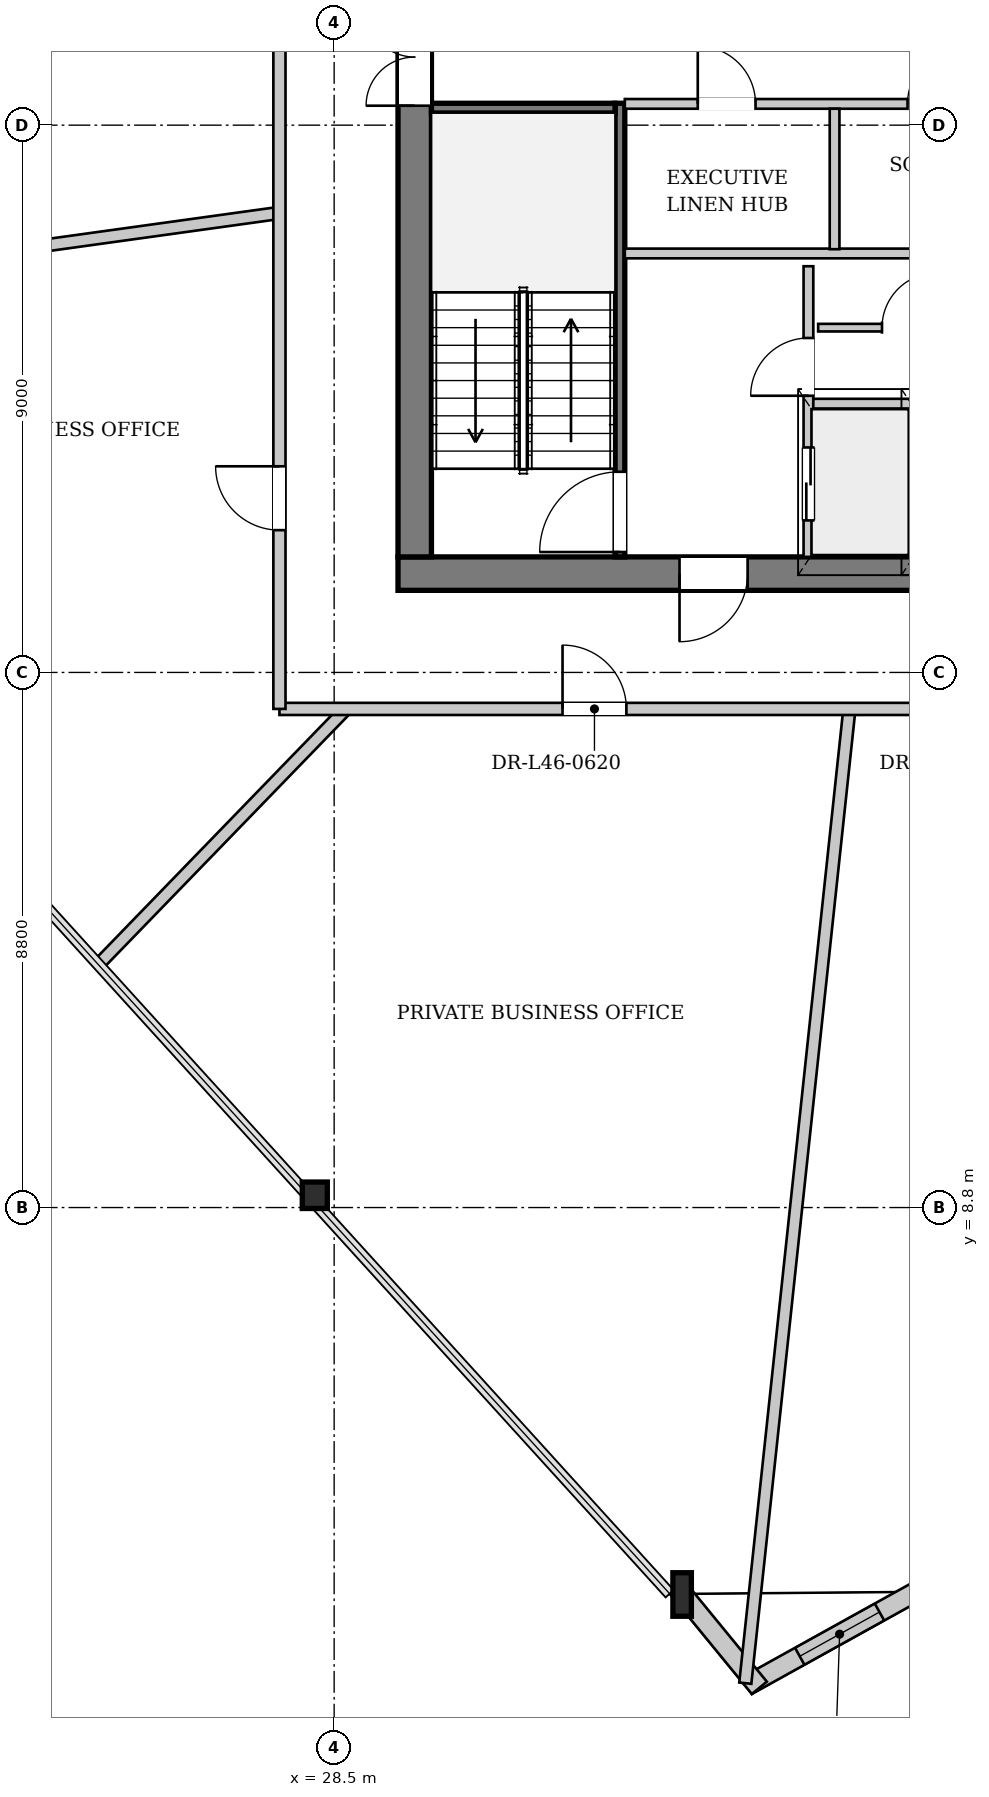
"""IFC4 building model, lengths in metres.
Left out: names, types, materials, properties, quantities, classifications, styles, units other than length and angle.
Written with IfcOpenShell. Run it as: python <this file> out.ifc"""

import sys

from ifc_helpers import new_model, si_unit, direction, frame, frame_2d, origin, origin_2d, place, context, subcontext, project, spatial, rectangle, i_section, extrude, source, transform, mapped, element, fill, save


model = new_model("IFC4")
c1 = context("Model", 3, precision=1e-05, world=origin(), true_north=direction((0.0, 1.0)))
c2 = subcontext(c1, "Body", "Model", "MODEL_VIEW")
j1 = project(units=[si_unit("LENGTHUNIT", "METRE"), si_unit("PLANEANGLEUNIT", "RADIAN")], contexts=[c1])
p1 = place(None, origin())
s1 = spatial("IfcSite", under=j1, at=p1, CompositionType="ELEMENT")
p2 = place(p1, origin())
s2 = spatial("IfcBuilding", under=s1, at=p2, CompositionType="ELEMENT")
p3 = place(p2, frame((0.0, 0.0, 175.0)))
s3 = spatial("IfcBuildingStorey", under=s2, at=p3, CompositionType="ELEMENT", Elevation=175.0)
m1 = source(origin(), c2, "Body", "SweptSolid", [
    extrude(i_section(OverallWidth=0.412, OverallDepth=0.435, WebThickness=0.031, FlangeThickness=0.05, at=origin_2d()), origin(), (0.0, 0.0, 1.0), 3.403),
])
p4 = place(p3, frame((28.016, 9.058, 0.0), z_axis=(0.097141816378, -0.032643667985, 0.994735069479), x_axis=(0.318537097398, 0.947910395334, 0.0)))
e1 = element("IfcColumn", 1, at=p4, inside=s3, PredefinedType="COLUMN", context=c2, shape_type="MappedRepresentation", body=[
    mapped(m1, transform((0.0, 0.0, 0.0), x_axis=(1.0, 0.0, 0.0), y_axis=(0.0, 1.0, 0.0), z_axis=(0.0, 0.0, 1.0), scale=1.0)),
])
m2 = source(origin(), c2, "Body", "SweptSolid", [
    extrude(i_section(OverallWidth=0.304, OverallDepth=0.716, WebThickness=0.021, FlangeThickness=0.04, at=origin_2d()), origin(), (0.0, 0.0, 1.0), 3.41),
])
p5 = place(p3, frame((34.018, 2.449, 0.0), z_axis=(0.120214638994, -0.007517889872, 0.992719457804), x_axis=(0.062415293513, 0.998050264834, 0.0)))
e2 = element("IfcColumn", 2, at=p5, inside=s3, PredefinedType="COLUMN", context=c2, shape_type="MappedRepresentation", body=[
    mapped(m2, transform((0.0, 0.0, 0.0), x_axis=(1.0, 0.0, 0.0), y_axis=(0.0, 1.0, 0.0), z_axis=(0.0, 0.0, 1.0), scale=1.0)),
])
p6 = place(p3, frame((38.333, 2.628, 0.0), z_axis=(0.0, 0.0, 1.0), x_axis=(-0.874431894113, -0.485148289246, 0.0)))
e3 = element("IfcWall", 3, at=p6, inside=s3, PredefinedType="SOLIDWALL", context=c2, shape_type="SweptSolid", body=[
    extrude(rectangle(XDim=3.479, YDim=0.32, at=frame_2d((1.739, 0.0))), origin(), (0.0, 0.0, 1.0), 2.722),
])
p7 = place(p6, frame((0.989, 0.0, 0.302)))
e4 = element("IfcOpeningElement", 4, at=p7, cuts=e3, PredefinedType="OPENING", context=c2, shape_type="SweptSolid", body=[
    extrude(rectangle(XDim=1.5, YDim=2.3, at=frame_2d((0.75, 1.15))), frame((0.0, 0.17, 0.0), z_axis=(0.0, -1.0, 0.0), x_axis=(1.0, 0.0, 0.0)), (0.0, 0.0, 1.0), 0.34),
])
p8 = place(p3, frame((35.493, 0.901, 0.0), z_axis=(0.0, 0.0, 1.0), x_axis=(-0.633742690668, 0.773543923785, 0.0)))
e5 = element("IfcWall", 5, at=p8, inside=s3, PredefinedType="SOLIDWALL", context=c2, shape_type="SweptSolid", body=[
    extrude(rectangle(XDim=2.132, YDim=0.32, at=frame_2d((1.066, 0.0))), origin(), (0.0, 0.0, 1.0), 2.722),
])
p9 = place(p3, frame((46.45, 19.225, 0.0), z_axis=(0.0, 0.0, 1.0), x_axis=(-1.0, 0.0, 0.0)))
e6 = element("IfcWall", 6, at=p9, inside=s3, PredefinedType="SHEAR", context=c2, shape_type="SweptSolid", body=[
    extrude(rectangle(XDim=16.9, YDim=0.55, at=frame_2d((8.45, 0.0))), origin(), (0.0, 0.0, 1.0), 3.33),
])
p10 = place(p9, frame((4.65, 0.0, 0.0)))
e7 = element("IfcOpeningElement", 7, at=p10, cuts=e6, PredefinedType="OPENING", context=c2, shape_type="SweptSolid", body=[
    extrude(rectangle(XDim=1.12, YDim=2.25, at=frame_2d((0.56, 1.125))), frame((0.0, 0.285, 0.0), z_axis=(0.0, -1.0, 0.0), x_axis=(1.0, 0.0, 0.0)), (0.0, 0.0, 1.0), 0.57),
])
p11 = place(p9, frame((11.15, 0.0, 0.0)))
e8 = element("IfcOpeningElement", 8, at=p11, cuts=e6, PredefinedType="OPENING", context=c2, shape_type="SweptSolid", body=[
    extrude(rectangle(XDim=1.12, YDim=2.25, at=frame_2d((0.56, 1.125))), frame((0.0, 0.285, 0.0), z_axis=(0.0, -1.0, 0.0), x_axis=(1.0, 0.0, 0.0)), (0.0, 0.0, 1.0), 0.57),
])
p12 = place(p3, frame((29.825, 19.5, 0.0), z_axis=(0.0, 0.0, 1.0), x_axis=(0.0, 1.0, 0.0)))
e9 = element("IfcWall", 9, at=p12, inside=s3, PredefinedType="SHEAR", context=c2, shape_type="SweptSolid", body=[
    extrude(rectangle(XDim=14.2, YDim=0.55, at=frame_2d((7.1, 0.0))), origin(), (0.0, 0.0, 1.0), 3.33),
])
p13 = place(p12, frame((7.42, 0.0, 0.0)))
e10 = element("IfcOpeningElement", 10, at=p13, cuts=e9, PredefinedType="OPENING", context=c2, shape_type="SweptSolid", body=[
    extrude(rectangle(XDim=1.6, YDim=2.2, at=frame_2d((0.8, 1.1))), frame((0.0, 0.285, 0.0), z_axis=(0.0, -1.0, 0.0), x_axis=(1.0, 0.0, 0.0)), (0.0, 0.0, 1.0), 0.57),
])
p14 = place(p3, frame((33.2, 19.5, 0.0), z_axis=(0.0, 0.0, 1.0), x_axis=(0.0, 1.0, 0.0)))
e11 = element("IfcWall", 11, at=p14, inside=s3, PredefinedType="PARTITIONING", context=c2, shape_type="SweptSolid", body=[
    extrude(rectangle(XDim=7.46, YDim=0.16, at=frame_2d((3.73, 0.0))), origin(), (0.0, 0.0, 1.0), 3.33),
])
p15 = place(p14, frame((0.08, 0.0, 0.0)))
e12 = element("IfcOpeningElement", 12, at=p15, cuts=e11, PredefinedType="OPENING", context=c2, shape_type="SweptSolid", body=[
    extrude(rectangle(XDim=1.32, YDim=2.2, at=frame_2d((0.66, 1.1))), frame((0.0, 0.09, 0.0), z_axis=(0.0, -1.0, 0.0), x_axis=(1.0, 0.0, 0.0)), (0.0, 0.0, 1.0), 0.18),
])
p16 = place(p3, frame((30.1, 26.88, 0.0), z_axis=(0.0, 0.0, 1.0), x_axis=(1.0, 0.0, 0.0)))
e13 = element("IfcWall", 13, at=p16, inside=s3, PredefinedType="PARTITIONING", context=c2, shape_type="SweptSolid", body=[
    extrude(rectangle(XDim=3.02, YDim=0.16, at=frame_2d((1.51, 0.0))), origin(), (0.0, 0.0, 1.0), 3.33),
])
p17 = place(p3, frame((36.3, 19.5, 0.0), z_axis=(0.0, 0.0, 1.0), x_axis=(0.0, 1.0, 0.0)))
e14 = element("IfcWall", 14, at=p17, inside=s3, PredefinedType="PARTITIONING", context=c2, shape_type="SweptSolid", body=[
    extrude(rectangle(XDim=4.78, YDim=0.16, at=frame_2d((2.39, 0.0))), origin(), (0.0, 0.0, 1.0), 3.33),
])
p18 = place(p17, frame((0.6, 0.0, 0.0)))
e15 = element("IfcOpeningElement", 15, at=p18, cuts=e14, PredefinedType="OPENING", context=c2, shape_type="SweptSolid", body=[
    extrude(rectangle(XDim=1.2, YDim=2.2, at=frame_2d((0.6, 1.1))), frame((0.0, 0.09, 0.0), z_axis=(0.0, -1.0, 0.0), x_axis=(1.0, 0.0, 0.0)), (0.0, 0.0, 1.0), 0.18),
])
p19 = place(p17, frame((2.65, 0.0, 0.0)))
e16 = element("IfcOpeningElement", 16, at=p19, cuts=e14, PredefinedType="OPENING", context=c2, shape_type="SweptSolid", body=[
    extrude(rectangle(XDim=0.95, YDim=2.1, at=frame_2d((0.475, 1.05))), frame((0.0, 0.09, 0.0), z_axis=(0.0, -1.0, 0.0), x_axis=(1.0, 0.0, 0.0)), (0.0, 0.0, 1.0), 0.18),
])
p20 = place(p3, frame((38.0, 19.5, 0.0), z_axis=(0.0, 0.0, 1.0), x_axis=(0.0, 1.0, 0.0)))
e17 = element("IfcWall", 17, at=p20, inside=s3, PredefinedType="PARTITIONING", context=c2, shape_type="SweptSolid", body=[
    extrude(rectangle(XDim=2.46, YDim=0.125, at=frame_2d((1.23, 0.0))), origin(), (0.0, 0.0, 1.0), 3.33),
])
p21 = place(p3, frame((36.38, 22.02, 0.0), z_axis=(0.0, 0.0, 1.0), x_axis=(1.0, 0.0, 0.0)))
e18 = element("IfcWall", 18, at=p21, inside=s3, PredefinedType="PARTITIONING", context=c2, shape_type="SweptSolid", body=[
    extrude(rectangle(XDim=3.24, YDim=0.16, at=frame_2d((1.62, 0.0))), origin(), (0.0, 0.0, 1.0), 3.33),
])
p22 = place(p3, frame((33.28, 24.49, 0.0), z_axis=(0.0, 0.0, 1.0), x_axis=(1.0, 0.0, 0.0)))
e19 = element("IfcWall", 19, at=p22, inside=s3, PredefinedType="PARTITIONING", context=c2, shape_type="SweptSolid", body=[
    extrude(rectangle(XDim=9.44, YDim=0.16, at=frame_2d((4.72, 0.0))), origin(), (0.0, 0.0, 1.0), 3.33),
])
p23 = place(p3, frame((36.46, 23.27, 0.0), z_axis=(0.0, 0.0, 1.0), x_axis=(1.0, 0.0, 0.0)))
e20 = element("IfcWall", 20, at=p23, inside=s3, PredefinedType="PARTITIONING", context=c2, shape_type="SweptSolid", body=[
    extrude(rectangle(XDim=3.08, YDim=0.125, at=frame_2d((1.54, 0.0))), origin(), (0.0, 0.0, 1.0), 3.33),
])
p24 = place(p23, frame((1.05, 0.0, 0.0)))
e21 = element("IfcOpeningElement", 21, at=p24, cuts=e20, PredefinedType="OPENING", context=c2, shape_type="SweptSolid", body=[
    extrude(rectangle(XDim=0.9, YDim=2.1, at=frame_2d((0.45, 1.05))), frame((0.0, 0.073, 0.0), z_axis=(0.0, -1.0, 0.0), x_axis=(1.0, 0.0, 0.0)), (0.0, 0.0, 1.0), 0.145),
])
p25 = place(p3, frame((33.28, 26.95, 0.0), z_axis=(0.0, 0.0, 1.0), x_axis=(1.0, 0.0, 0.0)))
e22 = element("IfcWall", 22, at=p25, inside=s3, PredefinedType="PARTITIONING", context=c2, shape_type="SweptSolid", body=[
    extrude(rectangle(XDim=9.44, YDim=0.16, at=frame_2d((4.72, 0.0))), origin(), (0.0, 0.0, 1.0), 3.33),
])
p26 = place(p25, frame((1.2, 0.0, 0.0)))
e23 = element("IfcOpeningElement", 23, at=p26, cuts=e22, PredefinedType="OPENING", context=c2, shape_type="SweptSolid", body=[
    extrude(rectangle(XDim=0.95, YDim=2.1, at=frame_2d((0.475, 1.05))), frame((0.0, 0.09, 0.0), z_axis=(0.0, -1.0, 0.0), x_axis=(1.0, 0.0, 0.0)), (0.0, 0.0, 1.0), 0.18),
])
p27 = place(p25, frame((4.65, 0.0, 0.0)))
e24 = element("IfcOpeningElement", 24, at=p27, cuts=e22, PredefinedType="OPENING", context=c2, shape_type="SweptSolid", body=[
    extrude(rectangle(XDim=0.95, YDim=2.1, at=frame_2d((0.475, 1.05))), frame((0.0, 0.09, 0.0), z_axis=(0.0, -1.0, 0.0), x_axis=(1.0, 0.0, 0.0)), (0.0, 0.0, 1.0), 0.18),
])
p28 = place(p25, frame((7.67, 0.0, 0.0)))
e25 = element("IfcOpeningElement", 25, at=p28, cuts=e22, PredefinedType="OPENING", context=c2, shape_type="SweptSolid", body=[
    extrude(rectangle(XDim=1.1, YDim=2.2, at=frame_2d((0.55, 1.1))), frame((0.0, 0.09, 0.0), z_axis=(0.0, -1.0, 0.0), x_axis=(1.0, 0.0, 0.0)), (0.0, 0.0, 1.0), 0.18),
])
p29 = place(p3, frame((36.73, 24.56, 0.0), z_axis=(0.0, 0.0, 1.0), x_axis=(0.0, 1.0, 0.0)))
e26 = element("IfcWall", 26, at=p29, inside=s3, PredefinedType="PARTITIONING", context=c2, shape_type="SweptSolid", body=[
    extrude(rectangle(XDim=2.31, YDim=0.16, at=frame_2d((1.155, 0.0))), origin(), (0.0, 0.0, 1.0), 3.33),
])
p30 = place(p3, frame((27.6, 25.157, 0.0), z_axis=(0.0, 0.0, 1.0), x_axis=(-0.990508964045, -0.137448143484, 0.0)))
e27 = element("IfcWall", 27, at=p30, inside=s3, PredefinedType="PARTITIONING", context=c2, shape_type="SweptSolid", body=[
    extrude(rectangle(XDim=9.242, YDim=0.2, at=frame_2d((4.621, 0.0))), origin(), (0.0, 0.0, 1.0), 3.33),
])
p31 = place(p3, frame((28.697, 17.0, 0.0), z_axis=(0.0, 0.0, 1.0), x_axis=(-0.695914109274, -0.718125025684, 0.0)))
e28 = element("IfcWall", 28, at=p31, inside=s3, PredefinedType="PARTITIONING", context=c2, shape_type="SweptSolid", body=[
    extrude(rectangle(XDim=5.826, YDim=0.2, at=frame_2d((2.913, 0.0))), origin(), (0.0, 0.0, 1.0), 3.33),
])
p32 = place(p3, frame((36.974, 17.0, 0.0), z_axis=(0.0, 0.0, 1.0), x_axis=(-0.106274717856, -0.994336806291, 0.0)))
e29 = element("IfcWall", 29, at=p32, inside=s3, PredefinedType="PARTITIONING", context=c2, shape_type="SweptSolid", body=[
    extrude(rectangle(XDim=16.113, YDim=0.2, at=frame_2d((8.057, 0.0))), origin(), (0.0, 0.0, 1.0), 3.33),
])
p33 = place(p3, frame((27.6, 17.0, 0.0), z_axis=(0.0, 0.0, 1.0), x_axis=(1.0, 0.0, 0.0)))
e30 = element("IfcWall", 30, at=p33, inside=s3, PredefinedType="PARTITIONING", context=c2, shape_type="SweptSolid", body=[
    extrude(rectangle(XDim=20.8, YDim=0.2, at=frame_2d((10.4, 0.0))), origin(), (0.0, 0.0, 1.0), 3.33),
])
p34 = place(p33, frame((4.656, 0.0, 0.0)))
e31 = element("IfcOpeningElement", 31, at=p34, cuts=e30, PredefinedType="OPENING", context=c2, shape_type="SweptSolid", body=[
    extrude(rectangle(XDim=1.05, YDim=2.2, at=frame_2d((0.525, 1.1))), frame((0.0, 0.11, 0.0), z_axis=(0.0, -1.0, 0.0), x_axis=(1.0, 0.0, 0.0)), (0.0, 0.0, 1.0), 0.22),
])
p35 = place(p33, frame((11.041, 0.0, 0.0)))
e32 = element("IfcOpeningElement", 32, at=p35, cuts=e30, PredefinedType="OPENING", context=c2, shape_type="SweptSolid", body=[
    extrude(rectangle(XDim=1.05, YDim=2.2, at=frame_2d((0.525, 1.1))), frame((0.0, 0.11, 0.0), z_axis=(0.0, -1.0, 0.0), x_axis=(1.0, 0.0, 0.0)), (0.0, 0.0, 1.0), 0.22),
])
p36 = place(p33, frame((19.45, 0.0, 0.0)))
e33 = element("IfcOpeningElement", 33, at=p36, cuts=e30, PredefinedType="OPENING", context=c2, shape_type="SweptSolid", body=[
    extrude(rectangle(XDim=1.05, YDim=2.2, at=frame_2d((0.525, 1.1))), frame((0.0, 0.11, 0.0), z_axis=(0.0, -1.0, 0.0), x_axis=(1.0, 0.0, 0.0)), (0.0, 0.0, 1.0), 0.22),
])
p37 = place(p3, frame((27.6, 17.0, 0.0), z_axis=(0.0, 0.0, 1.0), x_axis=(0.0, 1.0, 0.0)))
e34 = element("IfcWall", 34, at=p37, inside=s3, PredefinedType="PARTITIONING", context=c2, shape_type="SweptSolid", body=[
    extrude(rectangle(XDim=19.2, YDim=0.2, at=frame_2d((9.6, 0.0))), origin(), (0.0, 0.0, 1.0), 3.33),
])
p38 = place(p37, frame((11.057, 0.0, 0.0)))
e35 = element("IfcOpeningElement", 35, at=p38, cuts=e34, PredefinedType="OPENING", context=c2, shape_type="SweptSolid", body=[
    extrude(rectangle(XDim=1.05, YDim=2.2, at=frame_2d((0.525, 1.1))), frame((0.0, 0.11, 0.0), z_axis=(0.0, -1.0, 0.0), x_axis=(1.0, 0.0, 0.0)), (0.0, 0.0, 1.0), 0.22),
])
p39 = place(p37, frame((2.94, 0.0, 0.0)))
e36 = element("IfcOpeningElement", 36, at=p39, cuts=e34, PredefinedType="OPENING", context=c2, shape_type="SweptSolid", body=[
    extrude(rectangle(XDim=1.05, YDim=2.2, at=frame_2d((0.525, 1.1))), frame((0.0, 0.11, 0.0), z_axis=(0.0, -1.0, 0.0), x_axis=(1.0, 0.0, 0.0)), (0.0, 0.0, 1.0), 0.22),
])
m3 = source(origin(), c2, "Body", "SweptSolid", [
    extrude(rectangle(XDim=1.5, YDim=2.3, at=frame_2d((0.75, 1.15))), frame((0.0, 0.03, 0.0), z_axis=(0.0, -1.0, 0.0), x_axis=(1.0, 0.0, 0.0)), (0.0, 0.0, 1.0), 0.06),
])
p40 = place(p7, origin())
e37 = element("IfcWindow", 37, at=p40, inside=s3, PartitioningType="SINGLE_PANEL", PredefinedType="WINDOW", context=c2, shape_type="MappedRepresentation", body=[
    mapped(m3, transform((0.0, 0.0, 0.0), x_axis=(1.0, 0.0, 0.0), y_axis=(0.0, 1.0, 0.0), z_axis=(0.0, 0.0, 1.0), scale=1.0)),
])
fill(e4, e37)
m4 = source(origin(), c2, "Body", "SweptSolid", [
    extrude(rectangle(XDim=1.12, YDim=2.25, at=frame_2d((0.56, 1.125))), frame((0.0, 0.025, 0.0), z_axis=(0.0, -1.0, 0.0), x_axis=(1.0, 0.0, 0.0)), (0.0, 0.0, 1.0), 0.05),
])
p41 = place(p11, origin())
e38 = element("IfcDoor", 38, at=p41, inside=s3, OperationType="SINGLE_SWING_RIGHT", PredefinedType="DOOR", context=c2, shape_type="MappedRepresentation", body=[
    mapped(m4, transform((0.0, 0.0, 0.0), x_axis=(1.0, 0.0, 0.0), y_axis=(0.0, 1.0, 0.0), z_axis=(0.0, 0.0, 1.0), scale=1.0)),
])
fill(e8, e38)
m5 = source(origin(), c2, "Body", "SweptSolid", [
    extrude(rectangle(XDim=1.6, YDim=2.2, at=frame_2d((0.8, 1.1))), frame((0.0, 0.025, 0.0), z_axis=(0.0, -1.0, 0.0), x_axis=(1.0, 0.0, 0.0)), (0.0, 0.0, 1.0), 0.05),
])
p42 = place(p13, origin())
e39 = element("IfcDoor", 39, at=p42, inside=s3, OperationType="DOUBLE_DOOR_SINGLE_SWING", PredefinedType="DOOR", context=c2, shape_type="MappedRepresentation", body=[
    mapped(m5, transform((0.0, 0.0, 0.0), x_axis=(1.0, 0.0, 0.0), y_axis=(0.0, 1.0, 0.0), z_axis=(0.0, 0.0, 1.0), scale=1.0)),
])
fill(e10, e39)
m6 = source(origin(), c2, "Body", "SweptSolid", [
    extrude(rectangle(XDim=1.32, YDim=2.2, at=frame_2d((0.66, 1.1))), frame((0.0, 0.025, 0.0), z_axis=(0.0, -1.0, 0.0), x_axis=(1.0, 0.0, 0.0)), (0.0, 0.0, 1.0), 0.05),
])
p43 = place(p15, origin())
e40 = element("IfcDoor", 40, at=p43, inside=s3, OperationType="SINGLE_SWING_LEFT", PredefinedType="DOOR", context=c2, shape_type="MappedRepresentation", body=[
    mapped(m6, transform((0.0, 0.0, 0.0), x_axis=(1.0, 0.0, 0.0), y_axis=(0.0, 1.0, 0.0), z_axis=(0.0, 0.0, 1.0), scale=1.0)),
])
fill(e12, e40)
m7 = source(origin(), c2, "Body", "SweptSolid", [
    extrude(rectangle(XDim=1.2, YDim=2.2, at=frame_2d((0.6, 1.1))), frame((0.0, 0.025, 0.0), z_axis=(0.0, -1.0, 0.0), x_axis=(1.0, 0.0, 0.0)), (0.0, 0.0, 1.0), 0.05),
])
p44 = place(p18, origin())
e41 = element("IfcDoor", 41, at=p44, inside=s3, OperationType="DOUBLE_DOOR_SLIDING", PredefinedType="DOOR", context=c2, shape_type="MappedRepresentation", body=[
    mapped(m7, transform((0.0, 0.0, 0.0), x_axis=(1.0, 0.0, 0.0), y_axis=(0.0, 1.0, 0.0), z_axis=(0.0, 0.0, 1.0), scale=1.0)),
])
fill(e15, e41)
m8 = source(origin(), c2, "Body", "SweptSolid", [
    extrude(rectangle(XDim=0.95, YDim=2.1, at=frame_2d((0.475, 1.05))), frame((0.0, 0.025, 0.0), z_axis=(0.0, -1.0, 0.0), x_axis=(1.0, 0.0, 0.0)), (0.0, 0.0, 1.0), 0.05),
])
p45 = place(p19, origin())
e42 = element("IfcDoor", 42, at=p45, inside=s3, OperationType="SINGLE_SWING_LEFT", PredefinedType="DOOR", context=c2, shape_type="MappedRepresentation", body=[
    mapped(m8, transform((0.0, 0.0, 0.0), x_axis=(1.0, 0.0, 0.0), y_axis=(0.0, 1.0, 0.0), z_axis=(0.0, 0.0, 1.0), scale=1.0)),
])
fill(e16, e42)
m9 = source(origin(), c2, "Body", "SweptSolid", [
    extrude(rectangle(XDim=0.9, YDim=2.1, at=frame_2d((0.45, 1.05))), frame((0.0, 0.025, 0.0), z_axis=(0.0, -1.0, 0.0), x_axis=(1.0, 0.0, 0.0)), (0.0, 0.0, 1.0), 0.05),
])
p46 = place(p24, origin())
e43 = element("IfcDoor", 43, at=p46, inside=s3, OperationType="SINGLE_SWING_RIGHT", PredefinedType="DOOR", context=c2, shape_type="MappedRepresentation", body=[
    mapped(m9, transform((0.0, 0.0, 0.0), x_axis=(1.0, 0.0, 0.0), y_axis=(0.0, 1.0, 0.0), z_axis=(0.0, 0.0, 1.0), scale=1.0)),
])
fill(e21, e43)
p47 = place(p26, origin())
e44 = element("IfcDoor", 44, at=p47, inside=s3, OperationType="SINGLE_SWING_LEFT", PredefinedType="DOOR", context=c2, shape_type="MappedRepresentation", body=[
    mapped(m8, transform((0.0, 0.0, 0.0), x_axis=(1.0, 0.0, 0.0), y_axis=(0.0, 1.0, 0.0), z_axis=(0.0, 0.0, 1.0), scale=1.0)),
])
fill(e23, e44)
p48 = place(p27, origin())
e45 = element("IfcDoor", 45, at=p48, inside=s3, OperationType="SINGLE_SWING_RIGHT", PredefinedType="DOOR", context=c2, shape_type="MappedRepresentation", body=[
    mapped(m8, transform((0.0, 0.0, 0.0), x_axis=(1.0, 0.0, 0.0), y_axis=(0.0, 1.0, 0.0), z_axis=(0.0, 0.0, 1.0), scale=1.0)),
])
fill(e24, e45)
m10 = source(origin(), c2, "Body", "SweptSolid", [
    extrude(rectangle(XDim=1.05, YDim=2.2, at=frame_2d((0.525, 1.1))), frame((0.0, 0.025, 0.0), z_axis=(0.0, -1.0, 0.0), x_axis=(1.0, 0.0, 0.0)), (0.0, 0.0, 1.0), 0.05),
])
p49 = place(p34, origin())
e46 = element("IfcDoor", 46, at=p49, inside=s3, OperationType="SINGLE_SWING_LEFT", PredefinedType="DOOR", context=c2, shape_type="MappedRepresentation", body=[
    mapped(m10, transform((0.0, 0.0, 0.0), x_axis=(1.0, 0.0, 0.0), y_axis=(0.0, 1.0, 0.0), z_axis=(0.0, 0.0, 1.0), scale=1.0)),
])
fill(e31, e46)
p50 = place(p39, origin())
e47 = element("IfcDoor", 47, at=p50, inside=s3, OperationType="SINGLE_SWING_RIGHT", PredefinedType="DOOR", context=c2, shape_type="MappedRepresentation", body=[
    mapped(m10, transform((0.0, 0.0, 0.0), x_axis=(1.0, 0.0, 0.0), y_axis=(0.0, 1.0, 0.0), z_axis=(0.0, 0.0, 1.0), scale=1.0)),
])
fill(e36, e47)
save(model, sys.argv[1])
